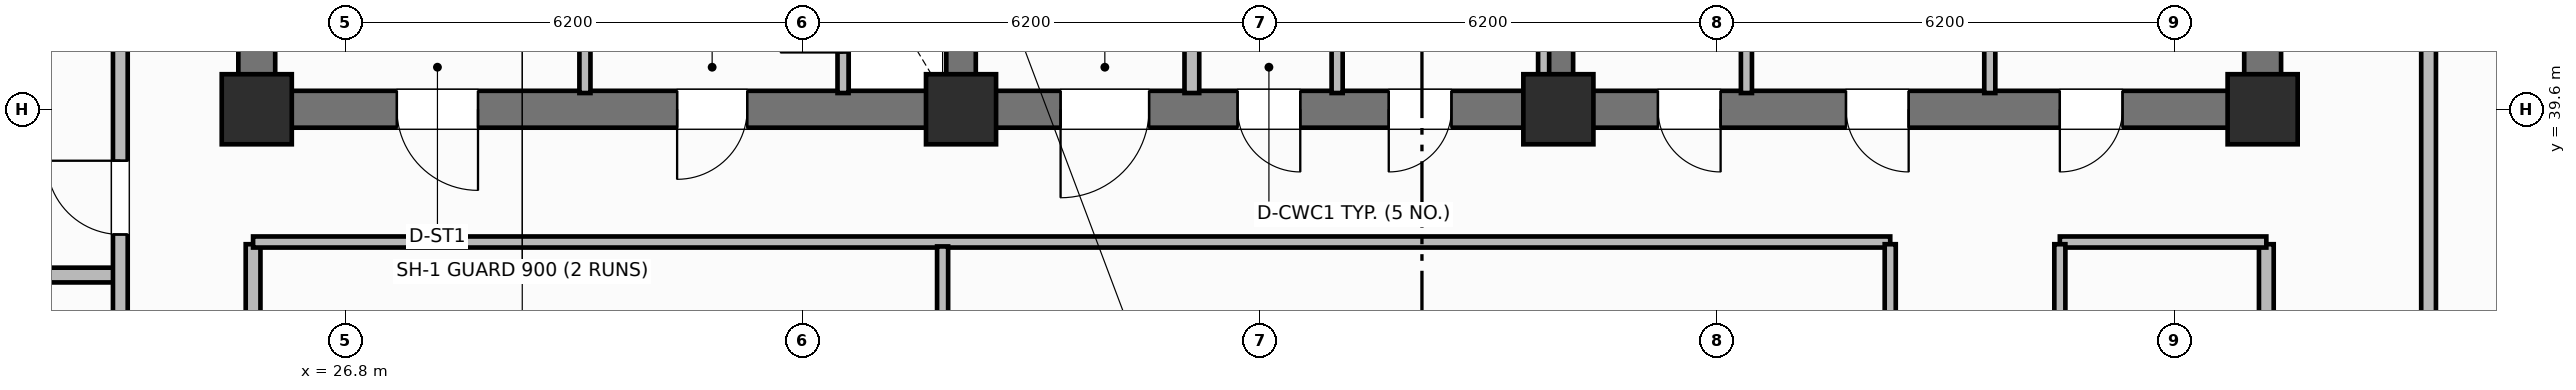
"""IFC4 building model, lengths in metres.
Left out: names, types, materials, properties, quantities, classifications, styles, units other than length and angle.
Written with IfcOpenShell. Run it as: python <this file> out.ifc"""

import sys

from ifc_helpers import new_model, si_unit, direction, frame, frame_2d, origin, origin_2d, place, context, subcontext, project, spatial, rectangle, extrude, element, fill, save


model = new_model("IFC4")
c1 = context("Model", 3, precision=1e-05, world=origin(), true_north=direction((0.0, 1.0)))
c2 = subcontext(c1, "Body", "Model", "MODEL_VIEW")
j1 = project(units=[si_unit("LENGTHUNIT", "METRE"), si_unit("PLANEANGLEUNIT", "RADIAN")], contexts=[c1])
p1 = place(None, origin())
s1 = spatial("IfcSite", under=j1, at=p1, CompositionType="ELEMENT")
p2 = place(p1, origin())
s2 = spatial("IfcBuilding", under=s1, at=p2, CompositionType="ELEMENT")
p3 = place(p2, frame((0.0, 0.0, 166.3)))
s3 = spatial("IfcBuildingStorey", under=s2, at=p3, CompositionType="ELEMENT", Elevation=166.3)
for number, where, z_axis, x_axis in (
    (1, (25.6, 39.85, 0.0), (0.0, 0.0, 1.0), (0.0, 1.0, 0.0)),
    (2, (52.8, 39.85, 0.0), (0.0, 0.0, 1.0), (0.0, 1.0, 0.0)),
):
    element("IfcWall", number, at=place(p3, frame(where, z_axis=z_axis, x_axis=x_axis)), inside=s3, PredefinedType="SHEAR", context=c2, shape_type="SweptSolid", body=[
        extrude(rectangle(XDim=5.7, YDim=0.5, at=frame_2d((2.85, 0.0))), origin(), (0.0, 0.0, 1.0), 3.7),
    ])
p4 = place(p3, frame((52.8, 39.6, 0.0), z_axis=(0.0, 0.0, 1.0), x_axis=(-1.0, 0.0, 0.0)))
e3 = element("IfcWall", 3, at=p4, inside=s3, PredefinedType="SHEAR", context=c2, shape_type="SweptSolid", body=[
    extrude(rectangle(XDim=27.2, YDim=0.5, at=frame_2d((13.6, 0.0))), origin(), (0.0, 0.0, 1.0), 3.7),
])
p5 = place(p4, frame((24.2, 0.0, 0.0)))
e4 = element("IfcOpeningElement", 4, at=p5, cuts=e3, PredefinedType="OPENING", context=c2, shape_type="SweptSolid", body=[
    extrude(rectangle(XDim=1.1, YDim=2.15, at=frame_2d((0.55, 1.075))), frame((0.0, 0.26, 0.0), z_axis=(0.0, -1.0, 0.0), x_axis=(1.0, 0.0, 0.0)), (0.0, 0.0, 1.0), 0.52),
])
p6 = place(p4, frame((20.55, 0.0, 0.0)))
e5 = element("IfcOpeningElement", 5, at=p6, cuts=e3, PredefinedType="OPENING", context=c2, shape_type="SweptSolid", body=[
    extrude(rectangle(XDim=0.95, YDim=2.1, at=frame_2d((0.475, 1.05))), frame((0.0, 0.26, 0.0), z_axis=(0.0, -1.0, 0.0), x_axis=(1.0, 0.0, 0.0)), (0.0, 0.0, 1.0), 0.52),
])
p7 = place(p4, frame((15.1, 0.0, 0.0)))
e6 = element("IfcOpeningElement", 6, at=p7, cuts=e3, PredefinedType="OPENING", context=c2, shape_type="SweptSolid", body=[
    extrude(rectangle(XDim=1.2, YDim=2.15, at=frame_2d((0.6, 1.075))), frame((0.0, 0.26, 0.0), z_axis=(0.0, -1.0, 0.0), x_axis=(1.0, 0.0, 0.0)), (0.0, 0.0, 1.0), 0.52),
])
p8 = place(p4, frame((13.05, 0.0, 0.0)))
e7 = element("IfcOpeningElement", 7, at=p8, cuts=e3, PredefinedType="OPENING", context=c2, shape_type="SweptSolid", body=[
    extrude(rectangle(XDim=0.85, YDim=2.1, at=frame_2d((0.425, 1.05))), frame((0.0, 0.26, 0.0), z_axis=(0.0, -1.0, 0.0), x_axis=(1.0, 0.0, 0.0)), (0.0, 0.0, 1.0), 0.52),
])
p9 = place(p4, frame((11.0, 0.0, 0.0)))
e8 = element("IfcOpeningElement", 8, at=p9, cuts=e3, PredefinedType="OPENING", context=c2, shape_type="SweptSolid", body=[
    extrude(rectangle(XDim=0.85, YDim=2.1, at=frame_2d((0.425, 1.05))), frame((0.0, 0.26, 0.0), z_axis=(0.0, -1.0, 0.0), x_axis=(1.0, 0.0, 0.0)), (0.0, 0.0, 1.0), 0.52),
])
p10 = place(p4, frame((7.35, 0.0, 0.0)))
e9 = element("IfcOpeningElement", 9, at=p10, cuts=e3, PredefinedType="OPENING", context=c2, shape_type="SweptSolid", body=[
    extrude(rectangle(XDim=0.85, YDim=2.1, at=frame_2d((0.425, 1.05))), frame((0.0, 0.26, 0.0), z_axis=(0.0, -1.0, 0.0), x_axis=(1.0, 0.0, 0.0)), (0.0, 0.0, 1.0), 0.52),
])
p11 = place(p4, frame((4.8, 0.0, 0.0)))
e10 = element("IfcOpeningElement", 10, at=p11, cuts=e3, PredefinedType="OPENING", context=c2, shape_type="SweptSolid", body=[
    extrude(rectangle(XDim=0.85, YDim=2.1, at=frame_2d((0.425, 1.05))), frame((0.0, 0.26, 0.0), z_axis=(0.0, -1.0, 0.0), x_axis=(1.0, 0.0, 0.0)), (0.0, 0.0, 1.0), 0.52),
])
p12 = place(p4, frame((1.9, 0.0, 0.0)))
e11 = element("IfcOpeningElement", 11, at=p12, cuts=e3, PredefinedType="OPENING", context=c2, shape_type="SweptSolid", body=[
    extrude(rectangle(XDim=0.85, YDim=2.1, at=frame_2d((0.425, 1.05))), frame((0.0, 0.26, 0.0), z_axis=(0.0, -1.0, 0.0), x_axis=(1.0, 0.0, 0.0)), (0.0, 0.0, 1.0), 0.52),
])
for number, where, z_axis, x_axis in (
    (12, (35.15, 39.85, 0.0), (0.0, 0.0, 1.0), (0.0, 1.0, 0.0)),
    (13, (43.25, 39.85, 0.0), (0.0, 0.0, 1.0), (0.0, 1.0, 0.0)),
):
    element("IfcWall", number, at=place(p3, frame(where, z_axis=z_axis, x_axis=x_axis)), inside=s3, PredefinedType="SHEAR", context=c2, shape_type="SweptSolid", body=[
        extrude(rectangle(XDim=5.7, YDim=0.4, at=frame_2d((2.85, 0.0))), origin(), (0.0, 0.0, 1.0), 3.7),
    ])
for number, where, z_axis, x_axis in (
    (14, (25.6, 39.6, 0.0), (0.0, 0.0, 1.0), (1.0, 0.0, 0.0)),
    (15, (35.15, 39.6, 0.0), (0.0, 0.0, 1.0), (1.0, 0.0, 0.0)),
    (16, (43.25, 39.6, 0.0), (0.0, 0.0, 1.0), (1.0, 0.0, 0.0)),
    (17, (52.8, 39.6, 0.0), (0.0, 0.0, 1.0), (1.0, 0.0, 0.0)),
):
    element("IfcColumn", number, at=place(p3, frame(where, z_axis=z_axis, x_axis=x_axis)), inside=s3, PredefinedType="COLUMN", context=c2, shape_type="SweptSolid", body=[
        extrude(rectangle(XDim=0.95, YDim=0.95, at=origin_2d()), origin(), (0.0, 0.0, 1.0), 3.7),
    ])
p13 = place(p3, frame((33.55, 39.82, 0.0), z_axis=(0.0, 0.0, 1.0), x_axis=(0.0, 1.0, 0.0)))
e18 = element("IfcWall", 18, at=p13, inside=s3, PredefinedType="PARTITIONING", context=c2, shape_type="SweptSolid", body=[
    extrude(rectangle(XDim=2.13, YDim=0.15, at=frame_2d((1.065, 0.0))), origin(), (0.0, 0.0, 1.0), 2.55),
])
p14 = place(p13, frame((0.55, 0.0, 0.0)))
e19 = element("IfcOpeningElement", 19, at=p14, cuts=e18, PredefinedType="OPENING", context=c2, shape_type="SweptSolid", body=[
    extrude(rectangle(XDim=0.85, YDim=2.05, at=frame_2d((0.425, 1.025))), frame((0.0, 0.085, 0.0), z_axis=(0.0, -1.0, 0.0), x_axis=(1.0, 0.0, 0.0)), (0.0, 0.0, 1.0), 0.17),
])
p15 = place(p3, frame((30.05, 39.82, 0.0), z_axis=(0.0, 0.0, 1.0), x_axis=(0.0, 1.0, 0.0)))
e20 = element("IfcWall", 20, at=p15, inside=s3, PredefinedType="PARTITIONING", context=c2, shape_type="SweptSolid", body=[
    extrude(rectangle(XDim=2.13, YDim=0.15, at=frame_2d((1.065, 0.0))), origin(), (0.0, 0.0, 1.0), 2.55),
])
p16 = place(p3, frame((38.28, 39.82, 0.0), z_axis=(0.0, 0.0, 1.0), x_axis=(0.0, 1.0, 0.0)))
e21 = element("IfcWall", 21, at=p16, inside=s3, PredefinedType="PARTITIONING", context=c2, shape_type="SweptSolid", body=[
    extrude(rectangle(XDim=5.63, YDim=0.2, at=frame_2d((2.815, 0.0))), origin(), (0.0, 0.0, 1.0), 2.55),
])
for number, where, z_axis, x_axis in (
    (22, (43.05, 39.82, 0.0), (0.0, 0.0, 1.0), (0.0, 1.0, 0.0)),
    (23, (40.25, 39.82, 0.0), (0.0, 0.0, 1.0), (0.0, 1.0, 0.0)),
    (24, (45.8, 39.82, 0.0), (0.0, 0.0, 1.0), (0.0, 1.0, 0.0)),
):
    element("IfcWall", number, at=place(p3, frame(where, z_axis=z_axis, x_axis=x_axis)), inside=s3, PredefinedType="PARTITIONING", context=c2, shape_type="SweptSolid", body=[
        extrude(rectangle(XDim=5.63, YDim=0.15, at=frame_2d((2.815, 0.0))), origin(), (0.0, 0.0, 1.0), 2.55),
    ])
p17 = place(p3, frame((49.1, 39.82, 0.0), z_axis=(0.0, 0.0, 1.0), x_axis=(0.0, 1.0, 0.0)))
e25 = element("IfcWall", 25, at=p17, inside=s3, PredefinedType="PARTITIONING", context=c2, shape_type="SweptSolid", body=[
    extrude(rectangle(XDim=2.73, YDim=0.15, at=frame_2d((1.365, 0.0))), origin(), (0.0, 0.0, 1.0), 2.55),
])
for number, where, z_axis, x_axis in (
    (26, (25.55, 18.63, 0.0), (0.0, 0.0, 1.0), (0.0, 1.0, 0.0)),
    (27, (52.85, 18.63, 0.0), (0.0, 0.0, 1.0), (0.0, 1.0, 0.0)),
):
    element("IfcWall", number, at=place(p3, frame(where, z_axis=z_axis, x_axis=x_axis)), inside=s3, PredefinedType="PARTITIONING", context=c2, shape_type="SweptSolid", body=[
        extrude(rectangle(XDim=19.14, YDim=0.2, at=frame_2d((9.57, 0.0))), origin(), (0.0, 0.0, 1.0), 2.55),
    ])
p18 = place(p3, frame((25.55, 37.8, 0.0), z_axis=(0.0, 0.0, 1.0), x_axis=(1.0, 0.0, 0.0)))
e28 = element("IfcWall", 28, at=p18, inside=s3, PredefinedType="PARTITIONING", context=c2, shape_type="SweptSolid", body=[
    extrude(rectangle(XDim=22.2, YDim=0.15, at=frame_2d((11.1, 0.0))), origin(), (0.0, 0.0, 1.0), 2.55),
])
p19 = place(p3, frame((50.05, 37.8, 0.0), z_axis=(0.0, 0.0, 1.0), x_axis=(1.0, 0.0, 0.0)))
e29 = element("IfcWall", 29, at=p19, inside=s3, PredefinedType="PARTITIONING", context=c2, shape_type="SweptSolid", body=[
    extrude(rectangle(XDim=2.8, YDim=0.15, at=frame_2d((1.4, 0.0))), origin(), (0.0, 0.0, 1.0), 2.55),
])
p20 = place(p3, frame((34.9, 18.66, 0.0), z_axis=(0.0, 0.0, 1.0), x_axis=(0.0, 1.0, 0.0)))
e30 = element("IfcWall", 30, at=p20, inside=s3, PredefinedType="PARTITIONING", context=c2, shape_type="SweptSolid", body=[
    extrude(rectangle(XDim=19.08, YDim=0.15, at=frame_2d((9.54, 0.0))), origin(), (0.0, 0.0, 1.0), 2.55),
])
p21 = place(p20, frame((5.0, 0.0, 0.0)))
e31 = element("IfcOpeningElement", 31, at=p21, cuts=e30, PredefinedType="OPENING", context=c2, shape_type="SweptSolid", body=[
    extrude(rectangle(XDim=1.0, YDim=2.15, at=frame_2d((0.5, 1.075))), frame((0.0, 0.085, 0.0), z_axis=(0.0, -1.0, 0.0), x_axis=(1.0, 0.0, 0.0)), (0.0, 0.0, 1.0), 0.17),
])
p22 = place(p3, frame((47.75, 18.63, 0.0), z_axis=(0.0, 0.0, 1.0), x_axis=(0.0, 1.0, 0.0)))
e32 = element("IfcWall", 32, at=p22, inside=s3, PredefinedType="PARTITIONING", context=c2, shape_type="SweptSolid", body=[
    extrude(rectangle(XDim=19.14, YDim=0.15, at=frame_2d((9.57, 0.0))), origin(), (0.0, 0.0, 1.0), 2.55),
])
p23 = place(p22, frame((2.4, 0.0, 0.0)))
e33 = element("IfcOpeningElement", 33, at=p23, cuts=e32, PredefinedType="OPENING", context=c2, shape_type="SweptSolid", body=[
    extrude(rectangle(XDim=0.9, YDim=2.1, at=frame_2d((0.45, 1.05))), frame((0.0, 0.085, 0.0), z_axis=(0.0, -1.0, 0.0), x_axis=(1.0, 0.0, 0.0)), (0.0, 0.0, 1.0), 0.17),
])
p24 = place(p22, frame((10.804, 0.0, 0.0)))
e34 = element("IfcOpeningElement", 34, at=p24, cuts=e32, PredefinedType="OPENING", context=c2, shape_type="SweptSolid", body=[
    extrude(rectangle(XDim=0.9, YDim=2.1, at=frame_2d((0.45, 1.05))), frame((0.0, 0.085, 0.0), z_axis=(0.0, -1.0, 0.0), x_axis=(1.0, 0.0, 0.0)), (0.0, 0.0, 1.0), 0.17),
])
p25 = place(p3, frame((50.05, 18.63, 0.0), z_axis=(0.0, 0.0, 1.0), x_axis=(0.0, 1.0, 0.0)))
e35 = element("IfcWall", 35, at=p25, inside=s3, PredefinedType="PARTITIONING", context=c2, shape_type="SweptSolid", body=[
    extrude(rectangle(XDim=19.14, YDim=0.15, at=frame_2d((9.57, 0.0))), origin(), (0.0, 0.0, 1.0), 2.55),
])
p26 = place(p25, frame((2.4, 0.0, 0.0)))
e36 = element("IfcOpeningElement", 36, at=p26, cuts=e35, PredefinedType="OPENING", context=c2, shape_type="SweptSolid", body=[
    extrude(rectangle(XDim=1.0, YDim=2.15, at=frame_2d((0.5, 1.075))), frame((0.0, 0.085, 0.0), z_axis=(0.0, -1.0, 0.0), x_axis=(1.0, 0.0, 0.0)), (0.0, 0.0, 1.0), 0.17),
])
p27 = place(p25, frame((10.804, 0.0, 0.0)))
e37 = element("IfcOpeningElement", 37, at=p27, cuts=e35, PredefinedType="OPENING", context=c2, shape_type="SweptSolid", body=[
    extrude(rectangle(XDim=1.0, YDim=2.15, at=frame_2d((0.5, 1.075))), frame((0.0, 0.085, 0.0), z_axis=(0.0, -1.0, 0.0), x_axis=(1.0, 0.0, 0.0)), (0.0, 0.0, 1.0), 0.17),
])
p28 = place(p3, frame((16.57, 37.352, 0.0), z_axis=(0.0, 0.0, 1.0), x_axis=(1.0, 0.0, 0.0)))
e38 = element("IfcWall", 38, at=p28, inside=s3, PredefinedType="PARTITIONING", context=c2, shape_type="SweptSolid", body=[
    extrude(rectangle(XDim=7.18, YDim=0.2, at=frame_2d((3.59, 0.0))), origin(), (0.0, 0.0, 1.0), 2.55),
])
p29 = place(p3, frame((23.75, 10.6, 0.0), z_axis=(0.0, 0.0, 1.0), x_axis=(0.0, 1.0, 0.0)))
e39 = element("IfcWall", 39, at=p29, inside=s3, PredefinedType="PARTITIONING", context=c2, shape_type="SweptSolid", body=[
    extrude(rectangle(XDim=35.2, YDim=0.2, at=frame_2d((17.6, 0.0))), origin(), (0.0, 0.0, 1.0), 2.55),
])
p30 = place(p29, frame((2.65, 0.0, 0.0)))
e40 = element("IfcOpeningElement", 40, at=p30, cuts=e39, PredefinedType="OPENING", context=c2, shape_type="SweptSolid", body=[
    extrude(rectangle(XDim=1.0, YDim=2.15, at=frame_2d((0.5, 1.075))), frame((0.0, 0.11, 0.0), z_axis=(0.0, -1.0, 0.0), x_axis=(1.0, 0.0, 0.0)), (0.0, 0.0, 1.0), 0.22),
])
p31 = place(p29, frame((11.4, 0.0, 0.0)))
e41 = element("IfcOpeningElement", 41, at=p31, cuts=e39, PredefinedType="OPENING", context=c2, shape_type="SweptSolid", body=[
    extrude(rectangle(XDim=1.0, YDim=2.15, at=frame_2d((0.5, 1.075))), frame((0.0, 0.11, 0.0), z_axis=(0.0, -1.0, 0.0), x_axis=(1.0, 0.0, 0.0)), (0.0, 0.0, 1.0), 0.22),
])
p32 = place(p29, frame((21.37, 0.0, 0.0)))
e42 = element("IfcOpeningElement", 42, at=p32, cuts=e39, PredefinedType="OPENING", context=c2, shape_type="SweptSolid", body=[
    extrude(rectangle(XDim=1.0, YDim=2.15, at=frame_2d((0.5, 1.075))), frame((0.0, 0.11, 0.0), z_axis=(0.0, -1.0, 0.0), x_axis=(1.0, 0.0, 0.0)), (0.0, 0.0, 1.0), 0.22),
])
p33 = place(p29, frame((27.302, 0.0, 0.0)))
e43 = element("IfcOpeningElement", 43, at=p33, cuts=e39, PredefinedType="OPENING", context=c2, shape_type="SweptSolid", body=[
    extrude(rectangle(XDim=1.0, YDim=2.15, at=frame_2d((0.5, 1.075))), frame((0.0, 0.11, 0.0), z_axis=(0.0, -1.0, 0.0), x_axis=(1.0, 0.0, 0.0)), (0.0, 0.0, 1.0), 0.22),
])
p34 = place(p3, frame((55.05, 10.6, 0.0), z_axis=(0.0, 0.0, 1.0), x_axis=(0.0, 1.0, 0.0)))
e44 = element("IfcWall", 44, at=p34, inside=s3, PredefinedType="PARTITIONING", context=c2, shape_type="SweptSolid", body=[
    extrude(rectangle(XDim=35.2, YDim=0.2, at=frame_2d((17.6, 0.0))), origin(), (0.0, 0.0, 1.0), 2.55),
])
p35 = place(p34, frame((2.65, 0.0, 0.0)))
e45 = element("IfcOpeningElement", 45, at=p35, cuts=e44, PredefinedType="OPENING", context=c2, shape_type="SweptSolid", body=[
    extrude(rectangle(XDim=1.0, YDim=2.15, at=frame_2d((0.5, 1.075))), frame((0.0, 0.11, 0.0), z_axis=(0.0, -1.0, 0.0), x_axis=(1.0, 0.0, 0.0)), (0.0, 0.0, 1.0), 0.22),
])
p36 = place(p34, frame((19.95, 0.0, 0.0)))
e46 = element("IfcOpeningElement", 46, at=p36, cuts=e44, PredefinedType="OPENING", context=c2, shape_type="SweptSolid", body=[
    extrude(rectangle(XDim=1.0, YDim=2.15, at=frame_2d((0.5, 1.075))), frame((0.0, 0.11, 0.0), z_axis=(0.0, -1.0, 0.0), x_axis=(1.0, 0.0, 0.0)), (0.0, 0.0, 1.0), 0.22),
])
p37 = place(p14, origin())
e47 = element("IfcDoor", 47, at=p37, inside=s3, OperationType="SINGLE_SWING_LEFT", PredefinedType="TRAPDOOR", context=c2, shape_type="SweptSolid", body=[
    extrude(rectangle(XDim=0.85, YDim=2.05, at=frame_2d((0.425, 1.025))), frame((0.0, 0.025, 0.0), z_axis=(0.0, -1.0, 0.0), x_axis=(1.0, 0.0, 0.0)), (0.0, 0.0, 1.0), 0.05),
])
fill(e19, e47)
p38 = place(p33, origin())
e48 = element("IfcDoor", 48, at=p38, inside=s3, OperationType="SINGLE_SWING_RIGHT", PredefinedType="DOOR", context=c2, shape_type="SweptSolid", body=[
    extrude(rectangle(XDim=1.0, YDim=2.15, at=frame_2d((0.5, 1.075))), frame((0.0, 0.025, 0.0), z_axis=(0.0, -1.0, 0.0), x_axis=(1.0, 0.0, 0.0)), (0.0, 0.0, 1.0), 0.05),
])
fill(e43, e48)
p39 = place(p5, origin())
e49 = element("IfcDoor", 49, at=p39, inside=s3, OperationType="SINGLE_SWING_LEFT", PredefinedType="DOOR", context=c2, shape_type="SweptSolid", body=[
    extrude(rectangle(XDim=1.1, YDim=2.15, at=frame_2d((0.55, 1.075))), frame((0.0, 0.025, 0.0), z_axis=(0.0, -1.0, 0.0), x_axis=(1.0, 0.0, 0.0)), (0.0, 0.0, 1.0), 0.05),
])
fill(e4, e49)
p40 = place(p6, origin())
e50 = element("IfcDoor", 50, at=p40, inside=s3, OperationType="SINGLE_SWING_RIGHT", PredefinedType="DOOR", context=c2, shape_type="SweptSolid", body=[
    extrude(rectangle(XDim=0.95, YDim=2.1, at=frame_2d((0.475, 1.05))), frame((0.0, 0.025, 0.0), z_axis=(0.0, -1.0, 0.0), x_axis=(1.0, 0.0, 0.0)), (0.0, 0.0, 1.0), 0.05),
])
fill(e5, e50)
p41 = place(p7, origin())
e51 = element("IfcDoor", 51, at=p41, inside=s3, OperationType="SINGLE_SWING_RIGHT", PredefinedType="DOOR", context=c2, shape_type="SweptSolid", body=[
    extrude(rectangle(XDim=1.2, YDim=2.15, at=frame_2d((0.6, 1.075))), frame((0.0, 0.025, 0.0), z_axis=(0.0, -1.0, 0.0), x_axis=(1.0, 0.0, 0.0)), (0.0, 0.0, 1.0), 0.05),
])
fill(e6, e51)
p42 = place(p8, origin())
e52 = element("IfcDoor", 52, at=p42, inside=s3, OperationType="SINGLE_SWING_LEFT", PredefinedType="DOOR", context=c2, shape_type="SweptSolid", body=[
    extrude(rectangle(XDim=0.85, YDim=2.1, at=frame_2d((0.425, 1.05))), frame((0.0, 0.025, 0.0), z_axis=(0.0, -1.0, 0.0), x_axis=(1.0, 0.0, 0.0)), (0.0, 0.0, 1.0), 0.05),
])
fill(e7, e52)
p43 = place(p9, origin())
e53 = element("IfcDoor", 53, at=p43, inside=s3, OperationType="SINGLE_SWING_RIGHT", PredefinedType="DOOR", context=c2, shape_type="SweptSolid", body=[
    extrude(rectangle(XDim=0.85, YDim=2.1, at=frame_2d((0.425, 1.05))), frame((0.0, 0.025, 0.0), z_axis=(0.0, -1.0, 0.0), x_axis=(1.0, 0.0, 0.0)), (0.0, 0.0, 1.0), 0.05),
])
fill(e8, e53)
p44 = place(p10, origin())
e54 = element("IfcDoor", 54, at=p44, inside=s3, OperationType="SINGLE_SWING_LEFT", PredefinedType="DOOR", context=c2, shape_type="SweptSolid", body=[
    extrude(rectangle(XDim=0.85, YDim=2.1, at=frame_2d((0.425, 1.05))), frame((0.0, 0.025, 0.0), z_axis=(0.0, -1.0, 0.0), x_axis=(1.0, 0.0, 0.0)), (0.0, 0.0, 1.0), 0.05),
])
fill(e9, e54)
p45 = place(p11, origin())
e55 = element("IfcDoor", 55, at=p45, inside=s3, OperationType="SINGLE_SWING_LEFT", PredefinedType="DOOR", context=c2, shape_type="SweptSolid", body=[
    extrude(rectangle(XDim=0.85, YDim=2.1, at=frame_2d((0.425, 1.05))), frame((0.0, 0.025, 0.0), z_axis=(0.0, -1.0, 0.0), x_axis=(1.0, 0.0, 0.0)), (0.0, 0.0, 1.0), 0.05),
])
fill(e10, e55)
p46 = place(p12, origin())
e56 = element("IfcDoor", 56, at=p46, inside=s3, OperationType="SINGLE_SWING_RIGHT", PredefinedType="DOOR", context=c2, shape_type="SweptSolid", body=[
    extrude(rectangle(XDim=0.85, YDim=2.1, at=frame_2d((0.425, 1.05))), frame((0.0, 0.025, 0.0), z_axis=(0.0, -1.0, 0.0), x_axis=(1.0, 0.0, 0.0)), (0.0, 0.0, 1.0), 0.05),
])
fill(e11, e56)
save(model, sys.argv[1])
